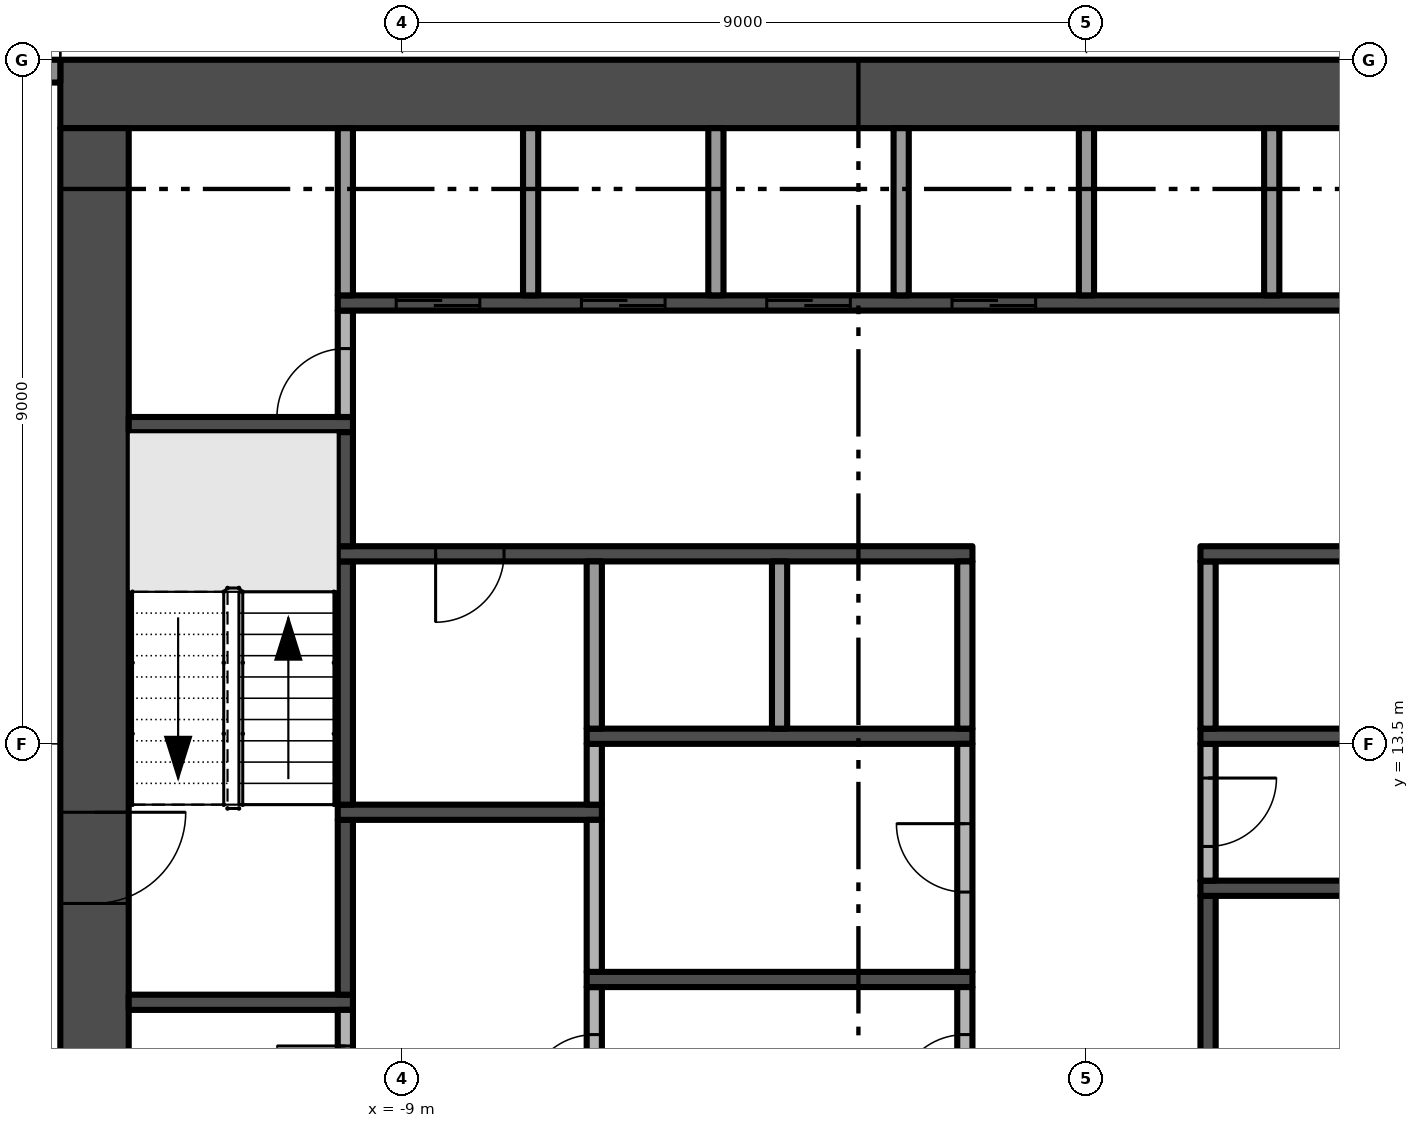
"""IFC4 building model, lengths in metres.
Left out: names, types, materials, properties, quantities, classifications, styles, units other than length and angle.
Written with IfcOpenShell. Run it as: python <this file> out.ifc"""

import sys

from ifc_helpers import new_model, si_unit, direction, frame, frame_2d, origin, place, context, subcontext, project, spatial, rectangle, extrude, element, fill, save


model = new_model("IFC4")
c1 = context("Model", 3, precision=1e-05, world=origin(), true_north=direction((0.0, 1.0)))
c2 = subcontext(c1, "Body", "Model", "MODEL_VIEW")
j1 = project(units=[si_unit("LENGTHUNIT", "METRE"), si_unit("PLANEANGLEUNIT", "RADIAN")], contexts=[c1])
p1 = place(None, origin())
s1 = spatial("IfcSite", under=j1, at=p1, CompositionType="ELEMENT")
p2 = place(p1, origin())
s2 = spatial("IfcBuilding", under=s1, at=p2, CompositionType="ELEMENT")
p3 = place(p2, frame((0.0, 0.0, 15.0)))
s3 = spatial("IfcBuildingStorey", under=s2, at=p3, CompositionType="ELEMENT", Elevation=15.0)
p4 = place(p3, frame((13.5, 22.05, -0.3), z_axis=(0.0, 0.0, 1.0), x_axis=(-1.0, 0.0, 0.0)))
e1 = element("IfcWall", 1, at=p4, inside=s3, PredefinedType="SHEAR", context=c2, shape_type="SweptSolid", body=[
    extrude(rectangle(XDim=27.0, YDim=0.9, at=frame_2d((13.5, 0.0))), origin(), (0.0, 0.0, 1.0), 3.8),
])
p5 = place(p3, frame((-13.05, 21.6, -0.3), z_axis=(0.0, 0.0, 1.0), x_axis=(0.0, -1.0, 0.0)))
e2 = element("IfcWall", 2, at=p5, inside=s3, PredefinedType="SHEAR", context=c2, shape_type="SweptSolid", body=[
    extrude(rectangle(XDim=16.2, YDim=0.9, at=frame_2d((8.1, 0.0))), origin(), (0.0, 0.0, 1.0), 3.8),
])
p6 = place(p5, frame((9.0, 0.0, 0.3)))
e3 = element("IfcOpeningElement", 3, at=p6, cuts=e2, PredefinedType="OPENING", context=c2, shape_type="SweptSolid", body=[
    extrude(rectangle(XDim=1.2, YDim=2.2, at=frame_2d((0.6, 1.1))), frame((0.0, 0.46, 0.0), z_axis=(0.0, -1.0, 0.0), x_axis=(1.0, 0.0, 0.0)), (0.0, 0.0, 1.0), 0.92),
])
p7 = place(p3, frame((-17.25, 22.35, 0.0), z_axis=(0.0, 0.0, 1.0), x_axis=(1.0, 0.0, 0.0)))
e4 = element("IfcWall", 4, at=p7, inside=s3, PredefinedType="SOLIDWALL", context=c2, shape_type="SweptSolid", body=[
    extrude(rectangle(XDim=3.75, YDim=0.3, at=frame_2d((1.875, 0.0))), origin(), (0.0, 0.0, 1.0), 3.5),
])
p8 = place(p7, frame((0.3, 0.0, 0.0)))
e5 = element("IfcOpeningElement", 5, at=p8, cuts=e4, PredefinedType="OPENING", context=c2, shape_type="SweptSolid", body=[
    extrude(rectangle(XDim=2.6, YDim=2.4, at=frame_2d((1.3, 1.2))), frame((0.0, 0.16, 0.0), z_axis=(0.0, -1.0, 0.0), x_axis=(1.0, 0.0, 0.0)), (0.0, 0.0, 1.0), 0.32),
])
for number, where, z_axis, x_axis in (
    (6, (-12.6, 10.1, 0.0), (0.0, 0.0, 1.0), (1.0, 0.0, 0.0)),
    (7, (-12.6, 17.7, 0.0), (0.0, 0.0, 1.0), (1.0, 0.0, 0.0)),
):
    element("IfcWall", number, at=place(p3, frame(where, z_axis=z_axis, x_axis=x_axis)), inside=s3, PredefinedType="SHEAR", context=c2, shape_type="SweptSolid", body=[
        extrude(rectangle(XDim=2.95, YDim=0.2, at=frame_2d((1.475, 0.0))), origin(), (0.0, 0.0, 1.0), 3.5),
    ])
p9 = place(p3, frame((-9.75, 8.15, 0.0), z_axis=(0.0, 0.0, 1.0), x_axis=(0.0, 1.0, 0.0)))
e8 = element("IfcWall", 8, at=p9, inside=s3, PredefinedType="PARTITIONING", context=c2, shape_type="SweptSolid", body=[
    extrude(rectangle(XDim=1.85, YDim=0.2, at=frame_2d((0.925, 0.0))), origin(), (0.0, 0.0, 1.0), 3.5),
])
p10 = place(p9, frame((0.475, 0.0, 0.0)))
e9 = element("IfcOpeningElement", 9, at=p10, cuts=e8, PredefinedType="OPENING", context=c2, shape_type="SweptSolid", body=[
    extrude(rectangle(XDim=0.9, YDim=2.1, at=frame_2d((0.45, 1.05))), frame((0.0, 0.11, 0.0), z_axis=(0.0, -1.0, 0.0), x_axis=(1.0, 0.0, 0.0)), (0.0, 0.0, 1.0), 0.22),
])
p11 = place(p3, frame((-9.75, 10.2, 0.0), z_axis=(0.0, 0.0, 1.0), x_axis=(0.0, 1.0, 0.0)))
e10 = element("IfcWall", 10, at=p11, inside=s3, PredefinedType="SHEAR", context=c2, shape_type="SweptSolid", body=[
    extrude(rectangle(XDim=2.3, YDim=0.2, at=frame_2d((1.15, 0.0))), origin(), (0.0, 0.0, 1.0), 3.5),
])
p12 = place(p3, frame((-9.85, 12.6, 0.0), z_axis=(0.0, 0.0, 1.0), x_axis=(1.0, 0.0, 0.0)))
e11 = element("IfcWall", 11, at=p12, inside=s3, PredefinedType="SHEAR", context=c2, shape_type="SweptSolid", body=[
    extrude(rectangle(XDim=3.475, YDim=0.2, at=frame_2d((1.738, 0.0))), origin(), (0.0, 0.0, 1.0), 3.5),
])
p13 = place(p3, frame((-9.75, 12.7, 0.0), z_axis=(0.0, 0.0, 1.0), x_axis=(0.0, 1.0, 0.0)))
e12 = element("IfcWall", 12, at=p13, inside=s3, PredefinedType="SHEAR", context=c2, shape_type="SweptSolid", body=[
    extrude(rectangle(XDim=3.2, YDim=0.2, at=frame_2d((1.6, 0.0))), origin(), (0.0, 0.0, 1.0), 3.5),
])
p14 = place(p3, frame((-1.5, 16.0, 0.0), z_axis=(0.0, 0.0, 1.0), x_axis=(-1.0, 0.0, 0.0)))
e13 = element("IfcWall", 13, at=p14, inside=s3, PredefinedType="SHEAR", context=c2, shape_type="SweptSolid", body=[
    extrude(rectangle(XDim=8.35, YDim=0.2, at=frame_2d((4.175, 0.0))), origin(), (0.0, 0.0, 1.0), 3.5),
])
p15 = place(p14, frame((6.162, 0.0, 0.0)))
e14 = element("IfcOpeningElement", 14, at=p15, cuts=e13, PredefinedType="OPENING", context=c2, shape_type="SweptSolid", body=[
    extrude(rectangle(XDim=0.9, YDim=2.1, at=frame_2d((0.45, 1.05))), frame((0.0, 0.11, 0.0), z_axis=(0.0, -1.0, 0.0), x_axis=(1.0, 0.0, 0.0)), (0.0, 0.0, 1.0), 0.22),
])
p16 = place(p3, frame((-9.75, 16.1, 0.0), z_axis=(0.0, 0.0, 1.0), x_axis=(0.0, 1.0, 0.0)))
e15 = element("IfcWall", 15, at=p16, inside=s3, PredefinedType="SHEAR", context=c2, shape_type="SweptSolid", body=[
    extrude(rectangle(XDim=1.5, YDim=0.2, at=frame_2d((0.75, 0.0))), origin(), (0.0, 0.0, 1.0), 3.5),
])
p17 = place(p3, frame((-9.75, 17.8, 0.0), z_axis=(0.0, 0.0, 1.0), x_axis=(0.0, 1.0, 0.0)))
e16 = element("IfcWall", 16, at=p17, inside=s3, PredefinedType="PARTITIONING", context=c2, shape_type="SweptSolid", body=[
    extrude(rectangle(XDim=1.4, YDim=0.2, at=frame_2d((0.7, 0.0))), origin(), (0.0, 0.0, 1.0), 3.5),
])
p18 = place(p17, origin())
e17 = element("IfcOpeningElement", 17, at=p18, cuts=e16, PredefinedType="OPENING", context=c2, shape_type="SweptSolid", body=[
    extrude(rectangle(XDim=0.9, YDim=2.1, at=frame_2d((0.45, 1.05))), frame((0.0, 0.11, 0.0), z_axis=(0.0, -1.0, 0.0), x_axis=(1.0, 0.0, 0.0)), (0.0, 0.0, 1.0), 0.22),
])
p19 = place(p3, frame((-9.85, 19.3, 0.0), z_axis=(0.0, 0.0, 1.0), x_axis=(1.0, 0.0, 0.0)))
e18 = element("IfcWall", 18, at=p19, inside=s3, PredefinedType="SHEAR", context=c2, shape_type="SweptSolid", body=[
    extrude(rectangle(XDim=19.7, YDim=0.2, at=frame_2d((9.85, 0.0))), origin(), (0.0, 0.0, 1.0), 3.5),
])
p20 = place(p19, frame((0.769, 0.0, 0.0)))
e19 = element("IfcOpeningElement", 19, at=p20, cuts=e18, PredefinedType="OPENING", context=c2, shape_type="SweptSolid", body=[
    extrude(rectangle(XDim=1.1, YDim=2.1, at=frame_2d((0.55, 1.05))), frame((0.0, 0.11, 0.0), z_axis=(0.0, -1.0, 0.0), x_axis=(1.0, 0.0, 0.0)), (0.0, 0.0, 1.0), 0.22),
])
p21 = place(p19, frame((3.206, 0.0, 0.0)))
e20 = element("IfcOpeningElement", 20, at=p21, cuts=e18, PredefinedType="OPENING", context=c2, shape_type="SweptSolid", body=[
    extrude(rectangle(XDim=1.1, YDim=2.1, at=frame_2d((0.55, 1.05))), frame((0.0, 0.11, 0.0), z_axis=(0.0, -1.0, 0.0), x_axis=(1.0, 0.0, 0.0)), (0.0, 0.0, 1.0), 0.22),
])
p22 = place(p19, frame((5.644, 0.0, 0.0)))
e21 = element("IfcOpeningElement", 21, at=p22, cuts=e18, PredefinedType="OPENING", context=c2, shape_type="SweptSolid", body=[
    extrude(rectangle(XDim=1.1, YDim=2.1, at=frame_2d((0.55, 1.05))), frame((0.0, 0.11, 0.0), z_axis=(0.0, -1.0, 0.0), x_axis=(1.0, 0.0, 0.0)), (0.0, 0.0, 1.0), 0.22),
])
p23 = place(p19, frame((8.081, 0.0, 0.0)))
e22 = element("IfcOpeningElement", 22, at=p23, cuts=e18, PredefinedType="OPENING", context=c2, shape_type="SweptSolid", body=[
    extrude(rectangle(XDim=1.1, YDim=2.1, at=frame_2d((0.55, 1.05))), frame((0.0, 0.11, 0.0), z_axis=(0.0, -1.0, 0.0), x_axis=(1.0, 0.0, 0.0)), (0.0, 0.0, 1.0), 0.22),
])
for number, where, z_axis, x_axis in (
    (23, (-9.75, 19.4, 0.0), (0.0, 0.0, 1.0), (0.0, 1.0, 0.0)),
    (24, (-7.312, 19.4, 0.0), (0.0, 0.0, 1.0), (0.0, 1.0, 0.0)),
):
    element("IfcWall", number, at=place(p3, frame(where, z_axis=z_axis, x_axis=x_axis)), inside=s3, PredefinedType="PARTITIONING", context=c2, shape_type="SweptSolid", body=[
        extrude(rectangle(XDim=2.2, YDim=0.2, at=frame_2d((1.1, 0.0))), origin(), (0.0, 0.0, 1.0), 3.5),
    ])
p24 = place(p3, frame((-6.475, 8.15, 0.0), z_axis=(0.0, 0.0, 1.0), x_axis=(0.0, 1.0, 0.0)))
e25 = element("IfcWall", 25, at=p24, inside=s3, PredefinedType="PARTITIONING", context=c2, shape_type="SweptSolid", body=[
    extrude(rectangle(XDim=2.15, YDim=0.2, at=frame_2d((1.075, 0.0))), origin(), (0.0, 0.0, 1.0), 3.5),
])
p25 = place(p24, frame((0.625, 0.0, 0.0)))
e26 = element("IfcOpeningElement", 26, at=p25, cuts=e25, PredefinedType="OPENING", context=c2, shape_type="SweptSolid", body=[
    extrude(rectangle(XDim=0.9, YDim=2.1, at=frame_2d((0.45, 1.05))), frame((0.0, 0.11, 0.0), z_axis=(0.0, -1.0, 0.0), x_axis=(1.0, 0.0, 0.0)), (0.0, 0.0, 1.0), 0.22),
])
p26 = place(p3, frame((-6.575, 10.4, 0.0), z_axis=(0.0, 0.0, 1.0), x_axis=(1.0, 0.0, 0.0)))
e27 = element("IfcWall", 27, at=p26, inside=s3, PredefinedType="SHEAR", context=c2, shape_type="SweptSolid", body=[
    extrude(rectangle(XDim=5.075, YDim=0.2, at=frame_2d((2.538, 0.0))), origin(), (0.0, 0.0, 1.0), 3.5),
])
p27 = place(p3, frame((-6.475, 10.5, 0.0), z_axis=(0.0, 0.0, 1.0), x_axis=(0.0, 1.0, 0.0)))
e28 = element("IfcWall", 28, at=p27, inside=s3, PredefinedType="PARTITIONING", context=c2, shape_type="SweptSolid", body=[
    extrude(rectangle(XDim=2.0, YDim=0.2, at=frame_2d((1.0, 0.0))), origin(), (0.0, 0.0, 1.0), 3.5),
])
p28 = place(p3, frame((-6.475, 12.7, 0.0), z_axis=(0.0, 0.0, 1.0), x_axis=(0.0, 1.0, 0.0)))
e29 = element("IfcWall", 29, at=p28, inside=s3, PredefinedType="PARTITIONING", context=c2, shape_type="SweptSolid", body=[
    extrude(rectangle(XDim=0.8, YDim=0.2, at=frame_2d((0.4, 0.0))), origin(), (0.0, 0.0, 1.0), 3.5),
])
p29 = place(p3, frame((-6.575, 13.6, 0.0), z_axis=(0.0, 0.0, 1.0), x_axis=(1.0, 0.0, 0.0)))
e30 = element("IfcWall", 30, at=p29, inside=s3, PredefinedType="SHEAR", context=c2, shape_type="SweptSolid", body=[
    extrude(rectangle(XDim=5.075, YDim=0.2, at=frame_2d((2.538, 0.0))), origin(), (0.0, 0.0, 1.0), 3.5),
])
for number, where, z_axis, x_axis in (
    (31, (-6.475, 13.7, 0.0), (0.0, 0.0, 1.0), (0.0, 1.0, 0.0)),
    (32, (-4.875, 19.4, 0.0), (0.0, 0.0, 1.0), (0.0, 1.0, 0.0)),
    (33, (-4.037, 13.7, 0.0), (0.0, 0.0, 1.0), (0.0, 1.0, 0.0)),
    (34, (-2.438, 19.4, 0.0), (0.0, 0.0, 1.0), (0.0, 1.0, 0.0)),
):
    element("IfcWall", number, at=place(p3, frame(where, z_axis=z_axis, x_axis=x_axis)), inside=s3, PredefinedType="PARTITIONING", context=c2, shape_type="SweptSolid", body=[
        extrude(rectangle(XDim=2.2, YDim=0.2, at=frame_2d((1.1, 0.0))), origin(), (0.0, 0.0, 1.0), 3.5),
    ])
p30 = place(p3, frame((-1.6, 8.15, 0.0), z_axis=(0.0, 0.0, 1.0), x_axis=(0.0, 1.0, 0.0)))
e35 = element("IfcWall", 35, at=p30, inside=s3, PredefinedType="PARTITIONING", context=c2, shape_type="SweptSolid", body=[
    extrude(rectangle(XDim=2.15, YDim=0.2, at=frame_2d((1.075, 0.0))), origin(), (0.0, 0.0, 1.0), 3.5),
])
p31 = place(p30, frame((0.625, 0.0, 0.0)))
e36 = element("IfcOpeningElement", 36, at=p31, cuts=e35, PredefinedType="OPENING", context=c2, shape_type="SweptSolid", body=[
    extrude(rectangle(XDim=0.9, YDim=2.1, at=frame_2d((0.45, 1.05))), frame((0.0, 0.11, 0.0), z_axis=(0.0, -1.0, 0.0), x_axis=(1.0, 0.0, 0.0)), (0.0, 0.0, 1.0), 0.22),
])
p32 = place(p3, frame((-1.6, 10.5, 0.0), z_axis=(0.0, 0.0, 1.0), x_axis=(0.0, 1.0, 0.0)))
e37 = element("IfcWall", 37, at=p32, inside=s3, PredefinedType="PARTITIONING", context=c2, shape_type="SweptSolid", body=[
    extrude(rectangle(XDim=3.0, YDim=0.2, at=frame_2d((1.5, 0.0))), origin(), (0.0, 0.0, 1.0), 3.5),
])
p33 = place(p32, frame((1.05, 0.0, 0.0)))
e38 = element("IfcOpeningElement", 38, at=p33, cuts=e37, PredefinedType="OPENING", context=c2, shape_type="SweptSolid", body=[
    extrude(rectangle(XDim=0.9, YDim=2.1, at=frame_2d((0.45, 1.05))), frame((0.0, 0.11, 0.0), z_axis=(0.0, -1.0, 0.0), x_axis=(1.0, 0.0, 0.0)), (0.0, 0.0, 1.0), 0.22),
])
for number, where, z_axis, x_axis in (
    (39, (-1.6, 13.7, 0.0), (0.0, 0.0, 1.0), (0.0, 1.0, 0.0)),
    (40, (0.0, 19.4, 0.0), (0.0, 0.0, 1.0), (0.0, 1.0, 0.0)),
):
    element("IfcWall", number, at=place(p3, frame(where, z_axis=z_axis, x_axis=x_axis)), inside=s3, PredefinedType="PARTITIONING", context=c2, shape_type="SweptSolid", body=[
        extrude(rectangle(XDim=2.2, YDim=0.2, at=frame_2d((1.1, 0.0))), origin(), (0.0, 0.0, 1.0), 3.5),
    ])
p34 = place(p3, frame((1.6, 11.5, 0.0), z_axis=(0.0, 0.0, 1.0), x_axis=(0.0, -1.0, 0.0)))
e41 = element("IfcWall", 41, at=p34, inside=s3, PredefinedType="SHEAR", context=c2, shape_type="SweptSolid", body=[
    extrude(rectangle(XDim=6.1, YDim=0.2, at=frame_2d((3.05, 0.0))), origin(), (0.0, 0.0, 1.0), 3.5),
])
p35 = place(p34, frame((2.2, 0.0, 0.0)))
e42 = element("IfcOpeningElement", 42, at=p35, cuts=e41, PredefinedType="OPENING", context=c2, shape_type="SweptSolid", body=[
    extrude(rectangle(XDim=0.9, YDim=2.1, at=frame_2d((0.45, 1.05))), frame((0.0, 0.11, 0.0), z_axis=(0.0, -1.0, 0.0), x_axis=(1.0, 0.0, 0.0)), (0.0, 0.0, 1.0), 0.22),
])
p36 = place(p3, frame((1.5, 11.6, 0.0), z_axis=(0.0, 0.0, 1.0), x_axis=(1.0, 0.0, 0.0)))
e43 = element("IfcWall", 43, at=p36, inside=s3, PredefinedType="SHEAR", context=c2, shape_type="SweptSolid", body=[
    extrude(rectangle(XDim=5.075, YDim=0.2, at=frame_2d((2.538, 0.0))), origin(), (0.0, 0.0, 1.0), 3.5),
])
p37 = place(p3, frame((1.6, 13.5, 0.0), z_axis=(0.0, 0.0, 1.0), x_axis=(0.0, -1.0, 0.0)))
e44 = element("IfcWall", 44, at=p37, inside=s3, PredefinedType="PARTITIONING", context=c2, shape_type="SweptSolid", body=[
    extrude(rectangle(XDim=1.8, YDim=0.2, at=frame_2d((0.9, 0.0))), origin(), (0.0, 0.0, 1.0), 3.5),
])
p38 = place(p37, frame((0.45, 0.0, 0.0)))
e45 = element("IfcOpeningElement", 45, at=p38, cuts=e44, PredefinedType="OPENING", context=c2, shape_type="SweptSolid", body=[
    extrude(rectangle(XDim=0.9, YDim=2.1, at=frame_2d((0.45, 1.05))), frame((0.0, 0.11, 0.0), z_axis=(0.0, -1.0, 0.0), x_axis=(1.0, 0.0, 0.0)), (0.0, 0.0, 1.0), 0.22),
])
p39 = place(p3, frame((1.5, 13.6, 0.0), z_axis=(0.0, 0.0, 1.0), x_axis=(1.0, 0.0, 0.0)))
e46 = element("IfcWall", 46, at=p39, inside=s3, PredefinedType="SHEAR", context=c2, shape_type="SweptSolid", body=[
    extrude(rectangle(XDim=5.075, YDim=0.2, at=frame_2d((2.538, 0.0))), origin(), (0.0, 0.0, 1.0), 3.5),
])
p40 = place(p3, frame((1.6, 13.7, 0.0), z_axis=(0.0, 0.0, 1.0), x_axis=(0.0, 1.0, 0.0)))
e47 = element("IfcWall", 47, at=p40, inside=s3, PredefinedType="PARTITIONING", context=c2, shape_type="SweptSolid", body=[
    extrude(rectangle(XDim=2.2, YDim=0.2, at=frame_2d((1.1, 0.0))), origin(), (0.0, 0.0, 1.0), 3.5),
])
p41 = place(p3, frame((9.85, 16.0, 0.0), z_axis=(0.0, 0.0, 1.0), x_axis=(-1.0, 0.0, 0.0)))
e48 = element("IfcWall", 48, at=p41, inside=s3, PredefinedType="SHEAR", context=c2, shape_type="SweptSolid", body=[
    extrude(rectangle(XDim=8.35, YDim=0.2, at=frame_2d((4.175, 0.0))), origin(), (0.0, 0.0, 1.0), 3.5),
])
p42 = place(p41, frame((1.288, 0.0, 0.0)))
e49 = element("IfcOpeningElement", 49, at=p42, cuts=e48, PredefinedType="OPENING", context=c2, shape_type="SweptSolid", body=[
    extrude(rectangle(XDim=0.9, YDim=2.1, at=frame_2d((0.45, 1.05))), frame((0.0, 0.11, 0.0), z_axis=(0.0, -1.0, 0.0), x_axis=(1.0, 0.0, 0.0)), (0.0, 0.0, 1.0), 0.22),
])
p43 = place(p3, frame((2.438, 19.4, 0.0), z_axis=(0.0, 0.0, 1.0), x_axis=(0.0, 1.0, 0.0)))
e50 = element("IfcWall", 50, at=p43, inside=s3, PredefinedType="PARTITIONING", context=c2, shape_type="SweptSolid", body=[
    extrude(rectangle(XDim=2.2, YDim=0.2, at=frame_2d((1.1, 0.0))), origin(), (0.0, 0.0, 1.0), 3.5),
])
p44 = place(p6, frame((1.2, 0.0, 0.0), z_axis=(0.0, 0.0, 1.0), x_axis=(-1.0, 0.0, 0.0)))
e51 = element("IfcDoor", 51, at=p44, inside=s3, OperationType="SINGLE_SWING_RIGHT", PredefinedType="DOOR", context=c2, shape_type="SweptSolid", body=[
    extrude(rectangle(XDim=1.2, YDim=2.2, at=frame_2d((0.6, 1.1))), frame((0.0, 0.025, 0.0), z_axis=(0.0, -1.0, 0.0), x_axis=(1.0, 0.0, 0.0)), (0.0, 0.0, 1.0), 0.05),
])
fill(e3, e51)
p45 = place(p20, origin())
e52 = element("IfcDoor", 52, at=p45, inside=s3, OperationType="SLIDING_TO_LEFT", PredefinedType="DOOR", context=c2, shape_type="SweptSolid", body=[
    extrude(rectangle(XDim=1.1, YDim=2.1, at=frame_2d((0.55, 1.05))), frame((0.0, 0.025, 0.0), z_axis=(0.0, -1.0, 0.0), x_axis=(1.0, 0.0, 0.0)), (0.0, 0.0, 1.0), 0.05),
])
fill(e19, e52)
p46 = place(p21, origin())
e53 = element("IfcDoor", 53, at=p46, inside=s3, OperationType="SLIDING_TO_LEFT", PredefinedType="DOOR", context=c2, shape_type="SweptSolid", body=[
    extrude(rectangle(XDim=1.1, YDim=2.1, at=frame_2d((0.55, 1.05))), frame((0.0, 0.025, 0.0), z_axis=(0.0, -1.0, 0.0), x_axis=(1.0, 0.0, 0.0)), (0.0, 0.0, 1.0), 0.05),
])
fill(e20, e53)
p47 = place(p22, origin())
e54 = element("IfcDoor", 54, at=p47, inside=s3, OperationType="SLIDING_TO_LEFT", PredefinedType="DOOR", context=c2, shape_type="SweptSolid", body=[
    extrude(rectangle(XDim=1.1, YDim=2.1, at=frame_2d((0.55, 1.05))), frame((0.0, 0.025, 0.0), z_axis=(0.0, -1.0, 0.0), x_axis=(1.0, 0.0, 0.0)), (0.0, 0.0, 1.0), 0.05),
])
fill(e21, e54)
p48 = place(p23, origin())
e55 = element("IfcDoor", 55, at=p48, inside=s3, OperationType="SLIDING_TO_LEFT", PredefinedType="DOOR", context=c2, shape_type="SweptSolid", body=[
    extrude(rectangle(XDim=1.1, YDim=2.1, at=frame_2d((0.55, 1.05))), frame((0.0, 0.025, 0.0), z_axis=(0.0, -1.0, 0.0), x_axis=(1.0, 0.0, 0.0)), (0.0, 0.0, 1.0), 0.05),
])
fill(e22, e55)
p49 = place(p15, origin())
e56 = element("IfcDoor", 56, at=p49, inside=s3, OperationType="SINGLE_SWING_RIGHT", PredefinedType="DOOR", context=c2, shape_type="SweptSolid", body=[
    extrude(rectangle(XDim=0.9, YDim=2.1, at=frame_2d((0.45, 1.05))), frame((0.0, 0.025, 0.0), z_axis=(0.0, -1.0, 0.0), x_axis=(1.0, 0.0, 0.0)), (0.0, 0.0, 1.0), 0.05),
])
fill(e14, e56)
p50 = place(p31, origin())
e57 = element("IfcDoor", 57, at=p50, inside=s3, OperationType="SINGLE_SWING_LEFT", PredefinedType="DOOR", context=c2, shape_type="SweptSolid", body=[
    extrude(rectangle(XDim=0.9, YDim=2.1, at=frame_2d((0.45, 1.05))), frame((0.0, 0.025, 0.0), z_axis=(0.0, -1.0, 0.0), x_axis=(1.0, 0.0, 0.0)), (0.0, 0.0, 1.0), 0.05),
])
fill(e36, e57)
p51 = place(p33, origin())
e58 = element("IfcDoor", 58, at=p51, inside=s3, OperationType="SINGLE_SWING_RIGHT", PredefinedType="DOOR", context=c2, shape_type="SweptSolid", body=[
    extrude(rectangle(XDim=0.9, YDim=2.1, at=frame_2d((0.45, 1.05))), frame((0.0, 0.025, 0.0), z_axis=(0.0, -1.0, 0.0), x_axis=(1.0, 0.0, 0.0)), (0.0, 0.0, 1.0), 0.05),
])
fill(e38, e58)
p52 = place(p38, origin())
e59 = element("IfcDoor", 59, at=p52, inside=s3, OperationType="SINGLE_SWING_LEFT", PredefinedType="DOOR", context=c2, shape_type="SweptSolid", body=[
    extrude(rectangle(XDim=0.9, YDim=2.1, at=frame_2d((0.45, 1.05))), frame((0.0, 0.025, 0.0), z_axis=(0.0, -1.0, 0.0), x_axis=(1.0, 0.0, 0.0)), (0.0, 0.0, 1.0), 0.05),
])
fill(e45, e59)
p53 = place(p18, origin())
e60 = element("IfcDoor", 60, at=p53, inside=s3, OperationType="SINGLE_SWING_LEFT", PredefinedType="DOOR", context=c2, shape_type="SweptSolid", body=[
    extrude(rectangle(XDim=0.9, YDim=2.1, at=frame_2d((0.45, 1.05))), frame((0.0, 0.025, 0.0), z_axis=(0.0, -1.0, 0.0), x_axis=(1.0, 0.0, 0.0)), (0.0, 0.0, 1.0), 0.05),
])
fill(e17, e60)
p54 = place(p25, origin())
e61 = element("IfcDoor", 61, at=p54, inside=s3, OperationType="SINGLE_SWING_LEFT", PredefinedType="DOOR", context=c2, shape_type="SweptSolid", body=[
    extrude(rectangle(XDim=0.9, YDim=2.1, at=frame_2d((0.45, 1.05))), frame((0.0, 0.025, 0.0), z_axis=(0.0, -1.0, 0.0), x_axis=(1.0, 0.0, 0.0)), (0.0, 0.0, 1.0), 0.05),
])
fill(e26, e61)
p55 = place(p10, origin())
e62 = element("IfcDoor", 62, at=p55, inside=s3, OperationType="SINGLE_SWING_RIGHT", PredefinedType="DOOR", context=c2, shape_type="SweptSolid", body=[
    extrude(rectangle(XDim=0.9, YDim=2.1, at=frame_2d((0.45, 1.05))), frame((0.0, 0.025, 0.0), z_axis=(0.0, -1.0, 0.0), x_axis=(1.0, 0.0, 0.0)), (0.0, 0.0, 1.0), 0.05),
])
fill(e9, e62)
save(model, sys.argv[1])
